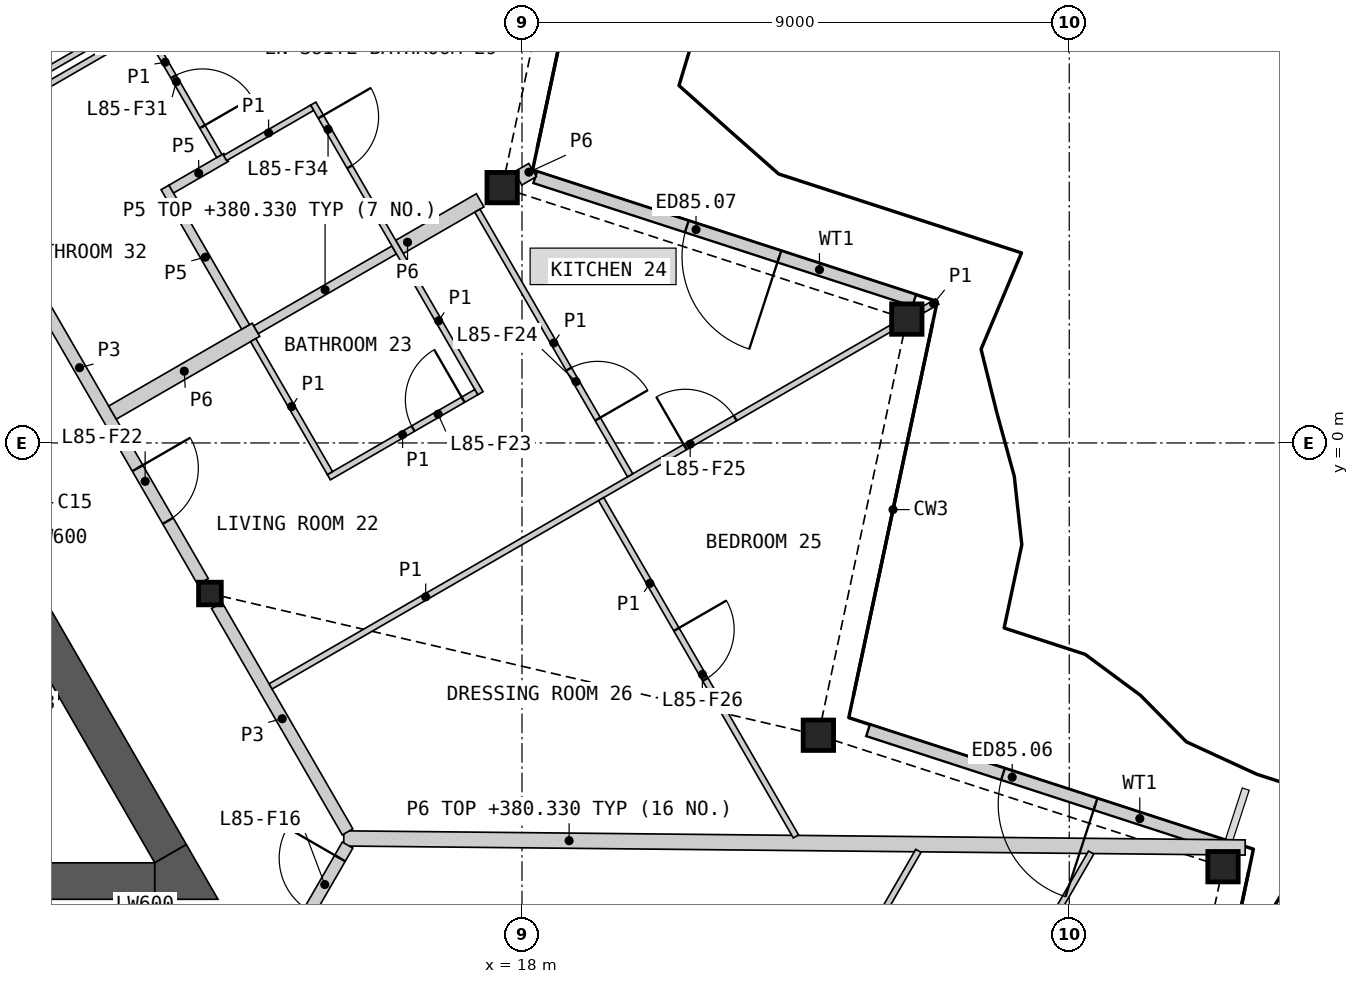
"""IFC4 building model, lengths in metres.
Left out: names, types, materials, properties, quantities, classifications, styles, units other than length and angle.
Written with IfcOpenShell. Run it as: python <this file> out.ifc"""

import sys

from ifc_helpers import new_model, si_unit, direction, frame, frame_2d, origin, origin_2d, place, context, subcontext, project, spatial, polyline, rectangle, hollow_rectangle, i_section, outline, extrude, element, fill, save


model = new_model("IFC4")
c1 = context("Model", 3, precision=1e-05, world=origin(), true_north=direction((0.0, 1.0)))
c2 = subcontext(c1, "Body", "Model", "MODEL_VIEW")
j1 = project(units=[si_unit("LENGTHUNIT", "METRE"), si_unit("PLANEANGLEUNIT", "RADIAN")], contexts=[c1])
p1 = place(None, origin())
s1 = spatial("IfcSite", under=j1, at=p1, CompositionType="ELEMENT")
p2 = place(p1, origin())
s2 = spatial("IfcBuilding", under=s1, at=p2, CompositionType="ELEMENT")
p3 = place(p2, frame((0.0, 0.0, 378.0)))
s3 = spatial("IfcBuildingStorey", under=s2, at=p3, CompositionType="ELEMENT", Elevation=378.0)
for number, where, z_axis, x_axis in (
    (1, (29.529, -6.969, 0.0), (0.0, 0.0, 1.0), (1.0, 0.0, 0.0)),
    (2, (22.874, -4.807, 0.0), (0.0, 0.0, 1.0), (1.0, 0.0, 0.0)),
    (3, (24.329, 2.037, 0.0), (0.0, 0.0, 1.0), (1.0, 0.0, 0.0)),
    (4, (17.674, 4.199, 0.0), (0.0, 0.0, 1.0), (1.0, 0.0, 0.0)),
):
    element("IfcColumn", number, at=place(p3, frame(where, z_axis=z_axis, x_axis=x_axis)), inside=s3, PredefinedType="COLUMN", context=c2, shape_type="SweptSolid", body=[
        extrude(hollow_rectangle(XDim=0.5, YDim=0.5, WallThickness=0.03, at=origin_2d()), origin(), (0.0, 0.0, 1.0), 3.4),
    ])
p4 = place(p3, frame((12.868, -2.476, 0.0), z_axis=(0.0, 0.0, 1.0), x_axis=(1.0, 0.0, 0.0)))
e5 = element("IfcColumn", 5, at=p4, inside=s3, PredefinedType="COLUMN", context=c2, shape_type="SweptSolid", body=[
    extrude(i_section(OverallWidth=0.374, OverallDepth=0.372, WebThickness=0.016, FlangeThickness=0.026, at=origin_2d()), origin(), (0.0, 0.0, 1.0), 3.4),
])
p5 = place(p3, frame((29.65, -6.663, 0.0), z_axis=(0.0, 0.0, 1.0), x_axis=(-0.951056402988, 0.3090173431, 0.0)))
e6 = element("IfcWall", 6, at=p5, inside=s3, PredefinedType="SOLIDWALL", context=c2, shape_type="SweptSolid", body=[
    extrude(rectangle(XDim=6.265, YDim=0.2, at=frame_2d((3.133, 0.0))), origin(), (0.0, 0.0, 1.0), 2.634),
])
p6 = place(p5, frame((2.333, 0.0, 0.0)))
e7 = element("IfcOpeningElement", 7, at=p6, cuts=e6, PredefinedType="OPENING", context=c2, shape_type="SweptSolid", body=[
    extrude(rectangle(XDim=1.6, YDim=2.25, at=frame_2d((0.8, 1.125))), frame((0.0, 0.11, 0.0), z_axis=(0.0, -1.0, 0.0), x_axis=(1.0, 0.0, 0.0)), (0.0, 0.0, 1.0), 0.22),
])
p7 = place(p3, frame((24.45, 2.344, 0.0), z_axis=(0.0, 0.0, 1.0), x_axis=(-0.951062538214, 0.308998460199, 0.0)))
e8 = element("IfcWall", 8, at=p7, inside=s3, PredefinedType="SOLIDWALL", context=c2, shape_type="SweptSolid", body=[
    extrude(rectangle(XDim=6.553, YDim=0.2, at=frame_2d((3.277, 0.0))), origin(), (0.0, 0.0, 1.0), 2.634),
])
p8 = place(p7, frame((2.333, 0.0, 0.0)))
e9 = element("IfcOpeningElement", 9, at=p8, cuts=e8, PredefinedType="OPENING", context=c2, shape_type="SweptSolid", body=[
    extrude(rectangle(XDim=1.6, YDim=2.25, at=frame_2d((0.8, 1.125))), frame((0.0, 0.11, 0.0), z_axis=(0.0, -1.0, 0.0), x_axis=(1.0, 0.0, 0.0)), (0.0, 0.0, 1.0), 0.22),
])
p9 = place(p3, origin())
e10 = element("IfcWall", 10, at=p9, inside=s3, PredefinedType="SHEAR", context=c2, shape_type="SweptSolid", body=[
    extrude(outline(polyline([(8.83, -6.881), (10.374, -4.206), (10.032, -4.298), (8.738, -6.539), (8.83, -6.881)])), origin(), (0.0, 0.0, 1.0), 3.1),
])
p10 = place(p3, origin())
e11 = element("IfcWall", 11, at=p10, inside=s3, PredefinedType="SHEAR", context=c2, shape_type="SweptSolid", body=[
    extrude(outline(polyline([(10.032, -4.298), (10.374, -4.206), (5.307, -1.281), (5.182, -1.498), (10.032, -4.298)])), origin(), (0.0, 0.0, 1.0), 3.1),
])
p11 = place(p3, frame((-4.892, -7.206, 0.0), z_axis=(0.0, 0.0, 1.0), x_axis=(1.0, 0.0, 0.0)))
e12 = element("IfcWall", 12, at=p11, inside=s3, PredefinedType="SHEAR", context=c2, shape_type="SweptSolid", body=[
    extrude(rectangle(XDim=16.853, YDim=0.6, at=frame_2d((8.426, 0.0))), origin(), (0.0, 0.0, 1.0), 3.1),
])
p12 = place(p3, frame((12.221, -6.756, 0.0), z_axis=(0.0, 0.0, 1.0), x_axis=(-0.50000604952, 0.866021911064, 0.0)))
e13 = element("IfcWall", 13, at=p12, inside=s3, PredefinedType="SHEAR", context=c2, shape_type="SweptSolid", body=[
    extrude(rectangle(XDim=4.869, YDim=0.6, at=frame_2d((2.434, 0.0))), origin(), (0.0, 0.0, 1.0), 3.1),
])
p13 = place(p3, origin())
e14 = element("IfcWall", 14, at=p13, inside=s3, PredefinedType="SHEAR", context=c2, shape_type="SweptSolid", body=[
    extrude(outline(polyline([(11.961, -7.506), (11.961, -6.906), (12.48, -6.606), (13.0, -7.506), (11.961, -7.506)])), origin(), (0.0, 0.0, 1.0), 3.1),
])
p14 = place(p3, frame((15.069, -6.504, 0.0), z_axis=(0.0, 0.0, 1.0), x_axis=(0.999949045807, -0.01009483976, 0.0)))
e15 = element("IfcWall", 15, at=p14, inside=s3, PredefinedType="PARTITIONING", context=c2, shape_type="SweptSolid", body=[
    extrude(rectangle(XDim=14.825, YDim=0.25, at=frame_2d((7.413, 0.0))), origin(), (0.0, 0.0, 1.0), 2.33),
])
p15 = place(p3, frame((8.692, 4.756, 0.0), z_axis=(0.0, 0.0, 1.0), x_axis=(0.500001682468, -0.866024432409, 0.0)))
e16 = element("IfcWall", 16, at=p15, inside=s3, PredefinedType="PARTITIONING", context=c2, shape_type="SweptSolid", body=[
    extrude(rectangle(XDim=8.124, YDim=0.2, at=frame_2d((4.062, 0.0))), origin(), (0.0, 0.0, 1.0), 3.1),
])
p16 = place(p15, frame((5.97, 0.0, 0.0)))
e17 = element("IfcOpeningElement", 17, at=p16, cuts=e16, PredefinedType="OPENING", context=c2, shape_type="SweptSolid", body=[
    extrude(rectangle(XDim=1.0, YDim=2.1, at=frame_2d((0.5, 1.05))), frame((0.0, 0.11, 0.0), z_axis=(0.0, -1.0, 0.0), x_axis=(1.0, 0.0, 0.0)), (0.0, 0.0, 1.0), 0.22),
])
p17 = place(p3, frame((12.981, -2.673, 0.0), z_axis=(0.0, 0.0, 1.0), x_axis=(0.499986217557, -0.866033360935, 0.0)))
e18 = element("IfcWall", 18, at=p17, inside=s3, PredefinedType="PARTITIONING", context=c2, shape_type="SweptSolid", body=[
    extrude(rectangle(XDim=4.3, YDim=0.2, at=frame_2d((2.15, 0.0))), origin(), (0.0, 0.0, 1.0), 3.1),
])
p18 = place(p3, frame((13.293, -9.797, 0.0), z_axis=(0.0, 0.0, 1.0), x_axis=(0.499967746641, 0.866044024469, 0.0)))
e19 = element("IfcWall", 19, at=p18, inside=s3, PredefinedType="PARTITIONING", context=c2, shape_type="SweptSolid", body=[
    extrude(rectangle(XDim=3.676, YDim=0.2, at=frame_2d((1.838, 0.0))), origin(), (0.0, 0.0, 1.0), 3.1),
])
p19 = place(p18, frame((2.426, 0.0, 0.0)))
e20 = element("IfcOpeningElement", 20, at=p19, cuts=e19, PredefinedType="OPENING", context=c2, shape_type="SweptSolid", body=[
    extrude(rectangle(XDim=1.0, YDim=2.1, at=frame_2d((0.5, 1.05))), frame((0.0, 0.11, 0.0), z_axis=(0.0, -1.0, 0.0), x_axis=(1.0, 0.0, 0.0)), (0.0, 0.0, 1.0), 0.22),
])
p20 = place(p3, frame((11.265, 0.5, 0.0), z_axis=(0.0, 0.0, 1.0), x_axis=(0.866051307416, 0.49995513091, 0.0)))
e21 = element("IfcWall", 21, at=p20, inside=s3, PredefinedType="PARTITIONING", context=c2, shape_type="SweptSolid", body=[
    extrude(rectangle(XDim=2.725, YDim=0.25, at=frame_2d((1.362, 0.0))), origin(), (0.0, 0.0, 1.0), 2.33),
])
p21 = place(p3, frame((15.985, 3.224, 0.0), z_axis=(0.0, 0.0, 1.0), x_axis=(0.865989259495, 0.50006259852, 0.0)))
e22 = element("IfcWall", 22, at=p21, inside=s3, PredefinedType="PARTITIONING", context=c2, shape_type="SweptSolid", body=[
    extrude(rectangle(XDim=1.532, YDim=0.25, at=frame_2d((0.766, 0.0))), origin(), (0.0, 0.0, 1.0), 2.33),
])
p22 = place(p3, frame((17.934, 4.35, 0.0), z_axis=(0.0, 0.0, 1.0), x_axis=(0.866288059981, 0.499544789918, 0.0)))
e23 = element("IfcWall", 23, at=p22, inside=s3, PredefinedType="PARTITIONING", context=c2, shape_type="SweptSolid", body=[
    extrude(rectangle(XDim=0.278, YDim=0.25, at=frame_2d((0.139, 0.0))), origin(), (0.0, 0.0, 1.0), 2.33),
])
p23 = place(p3, frame((13.625, 1.862, 0.0), z_axis=(0.0, 0.0, 1.0), x_axis=(0.866013657776, 0.500020344131, 0.0)))
e24 = element("IfcWall", 24, at=p23, inside=s3, PredefinedType="PLUMBINGWALL", context=c2, shape_type="SweptSolid", body=[
    extrude(rectangle(XDim=2.625, YDim=0.15, at=frame_2d((1.312, 0.0))), origin(), (0.0, 0.0, 1.0), 2.33),
])
p24 = place(p3, frame((12.129, 4.203, 0.0), z_axis=(0.0, 0.0, 1.0), x_axis=(0.499993606316, -0.866029095148, 0.0)))
e25 = element("IfcWall", 25, at=p24, inside=s3, PredefinedType="PLUMBINGWALL", context=c2, shape_type="SweptSolid", body=[
    extrude(rectangle(XDim=2.65, YDim=0.15, at=frame_2d((1.325, 0.0))), origin(), (0.0, 0.0, 1.0), 2.33),
])
p25 = place(p3, frame((12.232, 4.175, 0.0), z_axis=(0.0, 0.0, 1.0), x_axis=(0.866056787991, 0.499945637019, 0.0)))
e26 = element("IfcWall", 26, at=p25, inside=s3, PredefinedType="PLUMBINGWALL", context=c2, shape_type="SweptSolid", body=[
    extrude(rectangle(XDim=1.042, YDim=0.15, at=frame_2d((0.521, 0.0))), origin(), (0.0, 0.0, 1.0), 2.33),
])
p26 = place(p3, frame((13.865, -4.004, 0.0), z_axis=(0.0, 0.0, 1.0), x_axis=(0.866023404247, 0.500003463284, 0.0)))
e27 = element("IfcWall", 27, at=p26, inside=s3, PredefinedType="PARTITIONING", context=c2, shape_type="SweptSolid", body=[
    extrude(rectangle(XDim=11.782, YDim=0.1, at=frame_2d((5.891, 0.0))), origin(), (0.0, 0.0, 1.0), 2.33),
])
p27 = place(p26, frame((7.874, 0.0, 0.0)))
e28 = element("IfcOpeningElement", 28, at=p27, cuts=e27, PredefinedType="OPENING", context=c2, shape_type="SweptSolid", body=[
    extrude(rectangle(XDim=0.95, YDim=2.1, at=frame_2d((0.475, 1.05))), frame((0.0, 0.06, 0.0), z_axis=(0.0, -1.0, 0.0), x_axis=(1.0, 0.0, 0.0)), (0.0, 0.0, 1.0), 0.12),
])
p28 = place(p3, frame((8.775, 5.066, 0.0), z_axis=(0.0, 0.0, 1.0), x_axis=(0.866023724155, 0.500002909193, 0.0)))
e29 = element("IfcWall", 29, at=p28, inside=s3, PredefinedType="PARTITIONING", context=c2, shape_type="SweptSolid", body=[
    extrude(rectangle(XDim=11.655, YDim=0.1, at=frame_2d((5.827, 0.0))), origin(), (0.0, 0.0, 1.0), 2.33),
])
p29 = place(p28, frame((3.751, 0.0, 0.0)))
e30 = element("IfcOpeningElement", 30, at=p29, cuts=e29, PredefinedType="OPENING", context=c2, shape_type="SweptSolid", body=[
    extrude(rectangle(XDim=0.95, YDim=2.1, at=frame_2d((0.475, 1.05))), frame((0.0, 0.06, 0.0), z_axis=(0.0, -1.0, 0.0), x_axis=(1.0, 0.0, 0.0)), (0.0, 0.0, 1.0), 0.12),
])
p30 = place(p3, frame((23.463, -13.488, 0.0), z_axis=(0.0, 0.0, 1.0), x_axis=(0.500012519194, 0.866018175704, 0.0)))
e31 = element("IfcWall", 31, at=p30, inside=s3, PredefinedType="PARTITIONING", context=c2, shape_type="SweptSolid", body=[
    extrude(rectangle(XDim=7.796, YDim=0.1, at=frame_2d((3.898, 0.0))), origin(), (0.0, 0.0, 1.0), 2.33),
])
p31 = place(p30, frame((3.473, 0.0, 0.0)))
e32 = element("IfcOpeningElement", 32, at=p31, cuts=e31, PredefinedType="OPENING", context=c2, shape_type="SweptSolid", body=[
    extrude(rectangle(XDim=0.95, YDim=2.1, at=frame_2d((0.475, 1.05))), frame((0.0, 0.06, 0.0), z_axis=(0.0, -1.0, 0.0), x_axis=(1.0, 0.0, 0.0)), (0.0, 0.0, 1.0), 0.12),
])
p32 = place(p3, frame((19.302, -0.923, 0.0), z_axis=(0.0, 0.0, 1.0), x_axis=(0.499999516514, -0.866025682925, 0.0)))
e33 = element("IfcWall", 33, at=p32, inside=s3, PredefinedType="PARTITIONING", context=c2, shape_type="SweptSolid", body=[
    extrude(rectangle(XDim=6.407, YDim=0.1, at=frame_2d((3.204, 0.0))), origin(), (0.0, 0.0, 1.0), 2.33),
])
p33 = place(p32, frame((2.476, 0.0, 0.0)))
e34 = element("IfcOpeningElement", 34, at=p33, cuts=e33, PredefinedType="OPENING", context=c2, shape_type="SweptSolid", body=[
    extrude(rectangle(XDim=0.95, YDim=2.1, at=frame_2d((0.475, 1.05))), frame((0.0, 0.06, 0.0), z_axis=(0.0, -1.0, 0.0), x_axis=(1.0, 0.0, 0.0)), (0.0, 0.0, 1.0), 0.12),
])
p34 = place(p3, frame((21.319, -12.251, 0.0), z_axis=(0.0, 0.0, 1.0), x_axis=(0.499999833739, 0.866025499775, 0.0)))
e35 = element("IfcWall", 35, at=p34, inside=s3, PredefinedType="PARTITIONING", context=c2, shape_type="SweptSolid", body=[
    extrude(rectangle(XDim=6.4, YDim=0.1, at=frame_2d((3.2, 0.0))), origin(), (0.0, 0.0, 1.0), 2.33),
])
p35 = place(p34, frame((1.26, 0.0, 0.0)))
e36 = element("IfcOpeningElement", 36, at=p35, cuts=e35, PredefinedType="OPENING", context=c2, shape_type="SweptSolid", body=[
    extrude(rectangle(XDim=0.95, YDim=2.1, at=frame_2d((0.475, 1.05))), frame((0.0, 0.06, 0.0), z_axis=(0.0, -1.0, 0.0), x_axis=(1.0, 0.0, 0.0)), (0.0, 0.0, 1.0), 0.12),
])
p36 = place(p3, frame((14.567, 5.581, 0.0), z_axis=(0.0, 0.0, 1.0), x_axis=(0.499996545922, -0.866027397988, 0.0)))
e37 = element("IfcWall", 37, at=p36, inside=s3, PredefinedType="PARTITIONING", context=c2, shape_type="SweptSolid", body=[
    extrude(rectangle(XDim=5.5, YDim=0.1, at=frame_2d((2.75, 0.0))), origin(), (0.0, 0.0, 1.0), 2.33),
])
p37 = place(p36, frame((0.25, 0.0, 0.0)))
e38 = element("IfcOpeningElement", 38, at=p37, cuts=e37, PredefinedType="OPENING", context=c2, shape_type="SweptSolid", body=[
    extrude(rectangle(XDim=0.95, YDim=2.1, at=frame_2d((0.475, 1.05))), frame((0.0, 0.06, 0.0), z_axis=(0.0, -1.0, 0.0), x_axis=(1.0, 0.0, 0.0)), (0.0, 0.0, 1.0), 0.12),
])
p38 = place(p3, frame((17.266, 3.82, 0.0), z_axis=(0.0, 0.0, 1.0), x_axis=(0.499990214365, -0.86603105345, 0.0)))
e39 = element("IfcWall", 39, at=p38, inside=s3, PredefinedType="PARTITIONING", context=c2, shape_type="SweptSolid", body=[
    extrude(rectangle(XDim=5.025, YDim=0.1, at=frame_2d((2.512, 0.0))), origin(), (0.0, 0.0, 1.0), 2.33),
])
p39 = place(p38, frame((3.008, 0.0, 0.0)))
e40 = element("IfcOpeningElement", 40, at=p39, cuts=e39, PredefinedType="OPENING", context=c2, shape_type="SweptSolid", body=[
    extrude(rectangle(XDim=0.95, YDim=2.1, at=frame_2d((0.475, 1.05))), frame((0.0, 0.06, 0.0), z_axis=(0.0, -1.0, 0.0), x_axis=(1.0, 0.0, 0.0)), (0.0, 0.0, 1.0), 0.12),
])
p40 = place(p3, frame((14.823, -0.564, 0.0), z_axis=(0.0, 0.0, 1.0), x_axis=(0.866034573852, 0.49998411664, 0.0)))
e41 = element("IfcWall", 41, at=p40, inside=s3, PredefinedType="PARTITIONING", context=c2, shape_type="SweptSolid", body=[
    extrude(rectangle(XDim=2.8, YDim=0.1, at=frame_2d((1.4, 0.0))), origin(), (0.0, 0.0, 1.0), 2.33),
])
p41 = place(p40, frame((1.6, 0.0, 0.0)))
e42 = element("IfcOpeningElement", 42, at=p41, cuts=e41, PredefinedType="OPENING", context=c2, shape_type="SweptSolid", body=[
    extrude(rectangle(XDim=0.95, YDim=2.1, at=frame_2d((0.475, 1.05))), frame((0.0, 0.06, 0.0), z_axis=(0.0, -1.0, 0.0), x_axis=(1.0, 0.0, 0.0)), (0.0, 0.0, 1.0), 0.12),
])
p42 = place(p3, frame((13.579, 1.691, 0.0), z_axis=(0.0, 0.0, 1.0), x_axis=(0.500048846702, -0.865997200291, 0.0)))
e43 = element("IfcWall", 43, at=p42, inside=s3, PredefinedType="PARTITIONING", context=c2, shape_type="SweptSolid", body=[
    extrude(rectangle(XDim=2.525, YDim=0.1, at=frame_2d((1.263, 0.0))), origin(), (0.0, 0.0, 1.0), 2.33),
])
p43 = place(p3, frame((8.488, 5.15, 0.0), z_axis=(0.0, 0.0, 1.0), x_axis=(0.866027727466, 0.499995975244, 0.0)))
e44 = element("IfcWall", 44, at=p43, inside=s3, PredefinedType="PARTITIONING", context=c2, shape_type="SweptSolid", body=[
    extrude(rectangle(XDim=2.73, YDim=0.1, at=frame_2d((1.365, 0.0))), origin(), (0.0, 0.0, 1.0), 2.33),
])
p44 = place(p3, frame((11.835, 6.775, 0.0), z_axis=(0.0, 0.0, 1.0), x_axis=(0.500030943131, -0.866007538022, 0.0)))
e45 = element("IfcWall", 45, at=p44, inside=s3, PredefinedType="PARTITIONING", context=c2, shape_type="SweptSolid", body=[
    extrude(rectangle(XDim=2.375, YDim=0.1, at=frame_2d((1.188, 0.0))), origin(), (0.0, 0.0, 1.0), 2.33),
])
p45 = place(p44, frame((0.867, 0.0, 0.0)))
e46 = element("IfcOpeningElement", 46, at=p45, cuts=e45, PredefinedType="OPENING", context=c2, shape_type="SweptSolid", body=[
    extrude(rectangle(XDim=0.95, YDim=2.1, at=frame_2d((0.475, 1.05))), frame((0.0, 0.06, 0.0), z_axis=(0.0, -1.0, 0.0), x_axis=(1.0, 0.0, 0.0)), (0.0, 0.0, 1.0), 0.12),
])
p46 = place(p3, frame((13.116, 4.686, 0.0), z_axis=(0.0, 0.0, 1.0), x_axis=(0.866072496716, 0.499918423778, 0.0)))
e47 = element("IfcWall", 47, at=p46, inside=s3, PredefinedType="PARTITIONING", context=c2, shape_type="SweptSolid", body=[
    extrude(rectangle(XDim=1.654, YDim=0.1, at=frame_2d((0.827, 0.0))), origin(), (0.0, 0.0, 1.0), 2.33),
])
p47 = place(p3, frame((24.589, 2.188, 0.0), z_axis=(0.0, 0.0, 1.0), x_axis=(0.866288059981, 0.499544789918, 0.0)))
e48 = element("IfcWall", 48, at=p47, inside=s3, PredefinedType="PARTITIONING", context=c2, shape_type="SweptSolid", body=[
    extrude(rectangle(XDim=0.278, YDim=0.1, at=frame_2d((0.139, 0.0))), origin(), (0.0, 0.0, 1.0), 2.33),
])
p48 = place(p6, origin())
e49 = element("IfcDoor", 49, at=p48, inside=s3, OperationType="DOUBLE_DOOR_SINGLE_SWING", PredefinedType="DOOR", context=c2, shape_type="SweptSolid", body=[
    extrude(rectangle(XDim=1.6, YDim=2.25, at=frame_2d((0.8, 1.125))), frame((0.0, 0.025, 0.0), z_axis=(0.0, -1.0, 0.0), x_axis=(1.0, 0.0, 0.0)), (0.0, 0.0, 1.0), 0.05),
])
fill(e7, e49)
p49 = place(p8, origin())
e50 = element("IfcDoor", 50, at=p49, inside=s3, OperationType="DOUBLE_DOOR_SINGLE_SWING", PredefinedType="DOOR", context=c2, shape_type="SweptSolid", body=[
    extrude(rectangle(XDim=1.6, YDim=2.25, at=frame_2d((0.8, 1.125))), frame((0.0, 0.025, 0.0), z_axis=(0.0, -1.0, 0.0), x_axis=(1.0, 0.0, 0.0)), (0.0, 0.0, 1.0), 0.05),
])
fill(e9, e50)
p50 = place(p19, origin())
e51 = element("IfcDoor", 51, at=p50, inside=s3, OperationType="SINGLE_SWING_RIGHT", PredefinedType="DOOR", context=c2, shape_type="SweptSolid", body=[
    extrude(rectangle(XDim=1.0, YDim=2.1, at=frame_2d((0.5, 1.05))), frame((0.0, 0.025, 0.0), z_axis=(0.0, -1.0, 0.0), x_axis=(1.0, 0.0, 0.0)), (0.0, 0.0, 1.0), 0.05),
])
fill(e20, e51)
p51 = place(p16, origin())
e52 = element("IfcDoor", 52, at=p51, inside=s3, OperationType="SINGLE_SWING_LEFT", PredefinedType="DOOR", context=c2, shape_type="SweptSolid", body=[
    extrude(rectangle(XDim=1.0, YDim=2.1, at=frame_2d((0.5, 1.05))), frame((0.0, 0.025, 0.0), z_axis=(0.0, -1.0, 0.0), x_axis=(1.0, 0.0, 0.0)), (0.0, 0.0, 1.0), 0.05),
])
fill(e17, e52)
p52 = place(p41, origin())
e53 = element("IfcDoor", 53, at=p52, inside=s3, OperationType="SINGLE_SWING_RIGHT", PredefinedType="DOOR", context=c2, shape_type="SweptSolid", body=[
    extrude(rectangle(XDim=0.95, YDim=2.1, at=frame_2d((0.475, 1.05))), frame((0.0, 0.025, 0.0), z_axis=(0.0, -1.0, 0.0), x_axis=(1.0, 0.0, 0.0)), (0.0, 0.0, 1.0), 0.05),
])
fill(e42, e53)
p53 = place(p39, origin())
e54 = element("IfcDoor", 54, at=p53, inside=s3, OperationType="SINGLE_SWING_RIGHT", PredefinedType="DOOR", context=c2, shape_type="SweptSolid", body=[
    extrude(rectangle(XDim=0.95, YDim=2.1, at=frame_2d((0.475, 1.05))), frame((0.0, 0.025, 0.0), z_axis=(0.0, -1.0, 0.0), x_axis=(1.0, 0.0, 0.0)), (0.0, 0.0, 1.0), 0.05),
])
fill(e40, e54)
p54 = place(p27, origin())
e55 = element("IfcDoor", 55, at=p54, inside=s3, OperationType="SINGLE_SWING_LEFT", PredefinedType="DOOR", context=c2, shape_type="SweptSolid", body=[
    extrude(rectangle(XDim=0.95, YDim=2.1, at=frame_2d((0.475, 1.05))), frame((0.0, 0.025, 0.0), z_axis=(0.0, -1.0, 0.0), x_axis=(1.0, 0.0, 0.0)), (0.0, 0.0, 1.0), 0.05),
])
fill(e28, e55)
p55 = place(p33, origin())
e56 = element("IfcDoor", 56, at=p55, inside=s3, OperationType="SINGLE_SWING_LEFT", PredefinedType="DOOR", context=c2, shape_type="SweptSolid", body=[
    extrude(rectangle(XDim=0.95, YDim=2.1, at=frame_2d((0.475, 1.05))), frame((0.0, 0.025, 0.0), z_axis=(0.0, -1.0, 0.0), x_axis=(1.0, 0.0, 0.0)), (0.0, 0.0, 1.0), 0.05),
])
fill(e34, e56)
p56 = place(p45, origin())
e57 = element("IfcDoor", 57, at=p56, inside=s3, OperationType="SINGLE_SWING_RIGHT", PredefinedType="DOOR", context=c2, shape_type="SweptSolid", body=[
    extrude(rectangle(XDim=0.95, YDim=2.1, at=frame_2d((0.475, 1.05))), frame((0.0, 0.025, 0.0), z_axis=(0.0, -1.0, 0.0), x_axis=(1.0, 0.0, 0.0)), (0.0, 0.0, 1.0), 0.05),
])
fill(e46, e57)
p57 = place(p37, origin())
e58 = element("IfcDoor", 58, at=p57, inside=s3, OperationType="SINGLE_SWING_LEFT", PredefinedType="DOOR", context=c2, shape_type="SweptSolid", body=[
    extrude(rectangle(XDim=0.95, YDim=2.1, at=frame_2d((0.475, 1.05))), frame((0.0, 0.025, 0.0), z_axis=(0.0, -1.0, 0.0), x_axis=(1.0, 0.0, 0.0)), (0.0, 0.0, 1.0), 0.05),
])
fill(e38, e58)
save(model, sys.argv[1])
